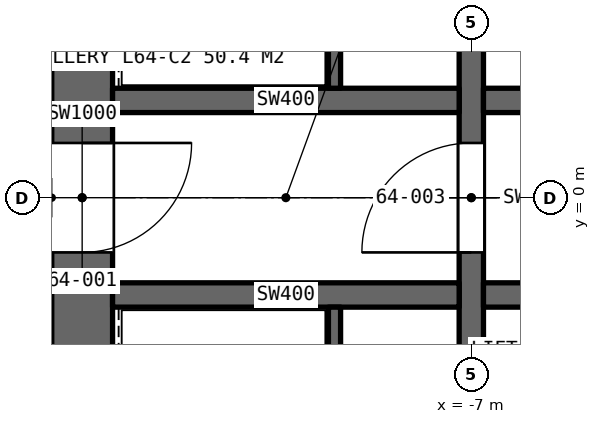
"""IFC4 building model, lengths in metres.
Left out: names, types, materials, properties, quantities, classifications, styles, units other than length and angle.
Written with IfcOpenShell. Run it as: python <this file> out.ifc"""

import sys

from ifc_helpers import new_model, si_unit, direction, frame, frame_2d, origin, place, context, subcontext, project, spatial, rectangle, extrude, element, fill, save


model = new_model("IFC4")
c1 = context("Model", 3, precision=1e-05, world=origin(), true_north=direction((0.0, 1.0)))
c2 = subcontext(c1, "Body", "Model", "MODEL_VIEW")
j1 = project(units=[si_unit("LENGTHUNIT", "METRE"), si_unit("PLANEANGLEUNIT", "RADIAN")], contexts=[c1])
p1 = place(None, origin())
s1 = spatial("IfcSite", under=j1, at=p1, CompositionType="ELEMENT")
p2 = place(p1, origin())
s2 = spatial("IfcBuilding", under=s1, at=p2, CompositionType="ELEMENT")
p3 = place(p2, frame((0.0, 0.0, 288.0)))
s3 = spatial("IfcBuildingStorey", under=s2, at=p3, CompositionType="ELEMENT", Elevation=288.0)
p4 = place(p3, frame((-13.4, 8.9, 0.0), z_axis=(0.0, 0.0, 1.0), x_axis=(0.0, -1.0, 0.0)))
e1 = element("IfcWall", 1, at=p4, inside=s3, PredefinedType="SHEAR", context=c2, shape_type="SweptSolid", body=[
    extrude(rectangle(XDim=17.8, YDim=1.0, at=frame_2d((8.9, 0.0))), origin(), (0.0, 0.0, 1.0), 4.2),
])
p5 = place(p4, frame((8.0, 0.0, 0.0)))
e2 = element("IfcOpeningElement", 2, at=p5, cuts=e1, PredefinedType="OPENING", context=c2, shape_type="SweptSolid", body=[
    extrude(rectangle(XDim=1.8, YDim=2.4, at=frame_2d((0.9, 1.2))), frame((0.0, 0.51, 0.0), z_axis=(0.0, -1.0, 0.0), x_axis=(1.0, 0.0, 0.0)), (0.0, 0.0, 1.0), 1.02),
])
p6 = place(p4, frame((16.6, 0.0, 0.0)))
e3 = element("IfcOpeningElement", 3, at=p6, cuts=e1, PredefinedType="OPENING", context=c2, shape_type="SweptSolid", body=[
    extrude(rectangle(XDim=1.0, YDim=2.4, at=frame_2d((0.5, 1.2))), frame((0.0, 0.51, 0.0), z_axis=(0.0, -1.0, 0.0), x_axis=(1.0, 0.0, 0.0)), (0.0, 0.0, 1.0), 1.02),
])
p7 = place(p3, frame((-7.0, -8.9, 0.0), z_axis=(0.0, 0.0, 1.0), x_axis=(0.0, 1.0, 0.0)))
e4 = element("IfcWall", 4, at=p7, inside=s3, PredefinedType="SHEAR", context=c2, shape_type="SweptSolid", body=[
    extrude(rectangle(XDim=17.8, YDim=0.4, at=frame_2d((8.9, 0.0))), origin(), (0.0, 0.0, 1.0), 4.2),
])
p8 = place(p7, frame((8.0, 0.0, 0.0)))
e5 = element("IfcOpeningElement", 5, at=p8, cuts=e4, PredefinedType="OPENING", context=c2, shape_type="SweptSolid", body=[
    extrude(rectangle(XDim=1.8, YDim=2.4, at=frame_2d((0.9, 1.2))), frame((0.0, 0.21, 0.0), z_axis=(0.0, -1.0, 0.0), x_axis=(1.0, 0.0, 0.0)), (0.0, 0.0, 1.0), 0.42),
])
p9 = place(p3, frame((-6.8, 1.6, 0.0), z_axis=(0.0, 0.0, 1.0), x_axis=(1.0, 0.0, 0.0)))
e6 = element("IfcWall", 6, at=p9, inside=s3, PredefinedType="SHEAR", context=c2, shape_type="SweptSolid", body=[
    extrude(rectangle(XDim=13.6, YDim=0.4, at=frame_2d((6.8, 0.0))), origin(), (0.0, 0.0, 1.0), 4.2),
])
p10 = place(p9, frame((2.365, 0.0, 0.0)))
e7 = element("IfcOpeningElement", 7, at=p10, cuts=e6, PredefinedType="OPENING", context=c2, shape_type="SweptSolid", body=[
    extrude(rectangle(XDim=1.0, YDim=2.4, at=frame_2d((0.5, 1.2))), frame((0.0, 0.21, 0.0), z_axis=(0.0, -1.0, 0.0), x_axis=(1.0, 0.0, 0.0)), (0.0, 0.0, 1.0), 0.42),
])
p11 = place(p9, frame((7.835, 0.0, 0.0)))
e8 = element("IfcOpeningElement", 8, at=p11, cuts=e6, PredefinedType="OPENING", context=c2, shape_type="SweptSolid", body=[
    extrude(rectangle(XDim=1.0, YDim=2.4, at=frame_2d((0.5, 1.2))), frame((0.0, 0.21, 0.0), z_axis=(0.0, -1.0, 0.0), x_axis=(1.0, 0.0, 0.0)), (0.0, 0.0, 1.0), 0.42),
])
p12 = place(p9, frame((11.9, 0.0, 0.0)))
e9 = element("IfcOpeningElement", 9, at=p12, cuts=e6, PredefinedType="OPENING", context=c2, shape_type="SweptSolid", body=[
    extrude(rectangle(XDim=1.0, YDim=2.4, at=frame_2d((0.5, 1.2))), frame((0.0, 0.21, 0.0), z_axis=(0.0, -1.0, 0.0), x_axis=(1.0, 0.0, 0.0)), (0.0, 0.0, 1.0), 0.42),
])
p13 = place(p3, frame((-6.8, -1.6, 0.0), z_axis=(0.0, 0.0, 1.0), x_axis=(1.0, 0.0, 0.0)))
e10 = element("IfcWall", 10, at=p13, inside=s3, PredefinedType="SHEAR", context=c2, shape_type="SweptSolid", body=[
    extrude(rectangle(XDim=13.6, YDim=0.4, at=frame_2d((6.8, 0.0))), origin(), (0.0, 0.0, 1.0), 4.2),
])
p14 = place(p13, frame((11.9, 0.0, 0.0)))
e11 = element("IfcOpeningElement", 11, at=p14, cuts=e10, PredefinedType="OPENING", context=c2, shape_type="SweptSolid", body=[
    extrude(rectangle(XDim=1.0, YDim=2.4, at=frame_2d((0.5, 1.2))), frame((0.0, 0.21, 0.0), z_axis=(0.0, -1.0, 0.0), x_axis=(1.0, 0.0, 0.0)), (0.0, 0.0, 1.0), 0.42),
])
p15 = place(p13, frame((4.5, 0.0, 0.0)))
e12 = element("IfcOpeningElement", 12, at=p15, cuts=e10, PredefinedType="OPENING", context=c2, shape_type="SweptSolid", body=[
    extrude(rectangle(XDim=1.8, YDim=2.4, at=frame_2d((0.9, 1.2))), frame((0.0, 0.21, 0.0), z_axis=(0.0, -1.0, 0.0), x_axis=(1.0, 0.0, 0.0)), (0.0, 0.0, 1.0), 0.42),
])
for number, where, z_axis, x_axis in (
    (13, (-12.9, 1.6, 0.0), (0.0, 0.0, 1.0), (1.0, 0.0, 0.0)),
    (14, (-12.9, -1.6, 0.0), (0.0, 0.0, 1.0), (1.0, 0.0, 0.0)),
):
    element("IfcWall", number, at=place(p3, frame(where, z_axis=z_axis, x_axis=x_axis)), inside=s3, PredefinedType="SHEAR", context=c2, shape_type="SweptSolid", body=[
        extrude(rectangle(XDim=5.7, YDim=0.4, at=frame_2d((2.85, 0.0))), origin(), (0.0, 0.0, 1.0), 4.2),
    ])
for number, where, z_axis, x_axis in (
    (15, (-9.25, 7.2, 0.0), (0.0, 0.0, 1.0), (0.0, -1.0, 0.0)),
    (16, (-9.25, -7.2, 0.0), (0.0, 0.0, 1.0), (0.0, 1.0, 0.0)),
):
    element("IfcWall", number, at=place(p3, frame(where, z_axis=z_axis, x_axis=x_axis)), inside=s3, PredefinedType="SOLIDWALL", context=c2, shape_type="SweptSolid", body=[
        extrude(rectangle(XDim=5.4, YDim=0.2, at=frame_2d((2.7, 0.0))), origin(), (0.0, 0.0, 1.0), 4.2),
    ])
p16 = place(p5, origin())
e17 = element("IfcDoor", 17, at=p16, inside=s3, OperationType="DOUBLE_DOOR_SINGLE_SWING", PredefinedType="DOOR", context=c2, shape_type="SweptSolid", body=[
    extrude(rectangle(XDim=1.8, YDim=2.4, at=frame_2d((0.9, 1.2))), frame((0.0, 0.025, 0.0), z_axis=(0.0, -1.0, 0.0), x_axis=(1.0, 0.0, 0.0)), (0.0, 0.0, 1.0), 0.05),
])
fill(e2, e17)
p17 = place(p8, origin())
e18 = element("IfcDoor", 18, at=p17, inside=s3, OperationType="DOUBLE_DOOR_SINGLE_SWING", PredefinedType="DOOR", context=c2, shape_type="SweptSolid", body=[
    extrude(rectangle(XDim=1.8, YDim=2.4, at=frame_2d((0.9, 1.2))), frame((0.0, 0.025, 0.0), z_axis=(0.0, -1.0, 0.0), x_axis=(1.0, 0.0, 0.0)), (0.0, 0.0, 1.0), 0.05),
])
fill(e5, e18)
save(model, sys.argv[1])
